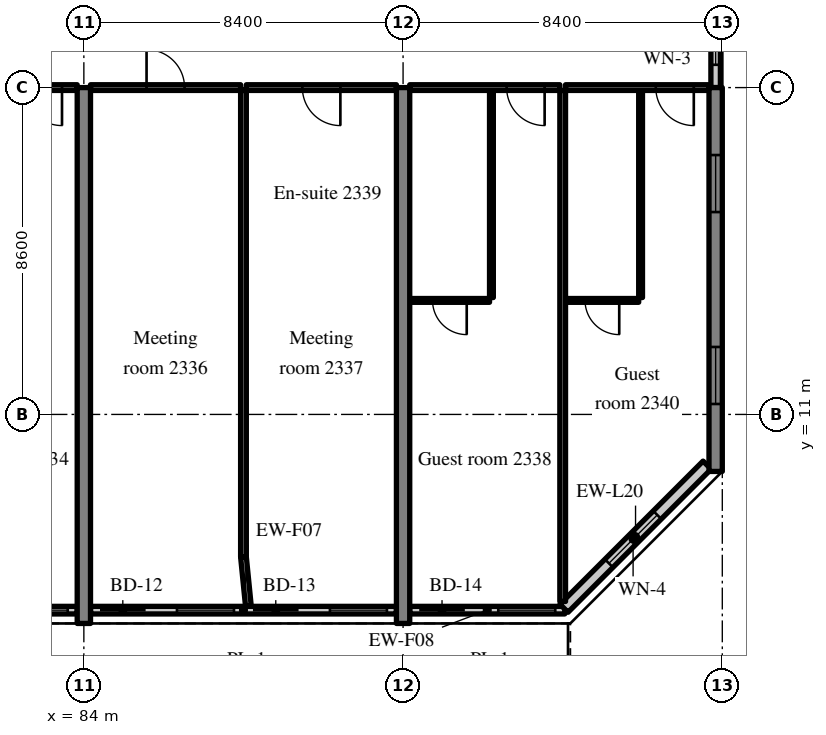
"""IFC4 building model, lengths in metres.
Left out: names, types, materials, properties, quantities, classifications, styles, units other than length and angle.
Written with IfcOpenShell. Run it as: python <this file> out.ifc"""

import sys

from ifc_helpers import new_model, si_unit, direction, frame, frame_2d, origin, place, context, subcontext, project, spatial, rectangle, extrude, source, transform, mapped, element, fill, save


model = new_model("IFC4")
c1 = context("Model", 3, precision=1e-05, world=origin(), true_north=direction((0.0, 1.0)))
c2 = subcontext(c1, "Body", "Model", "MODEL_VIEW")
j1 = project(units=[si_unit("LENGTHUNIT", "METRE"), si_unit("PLANEANGLEUNIT", "RADIAN")], contexts=[c1])
p1 = place(None, origin())
s1 = spatial("IfcSite", under=j1, at=p1, CompositionType="ELEMENT")
p2 = place(p1, origin())
s2 = spatial("IfcBuilding", under=s1, at=p2, CompositionType="ELEMENT")
p3 = place(p2, frame((0.0, 0.0, 99.0)))
s3 = spatial("IfcBuildingStorey", under=s2, at=p3, CompositionType="ELEMENT", Elevation=99.0)
m1 = source(origin(), c2, "Body", "SweptSolid", [
    extrude(rectangle(XDim=14.1, YDim=0.35, at=frame_2d((7.05, 0.0))), origin(), (0.0, 0.0, 1.0), 3.52),
])
for number, where, z_axis, x_axis in (
    (1, (84.0, 5.5, 0.0), (0.0, 0.0, 1.0), (0.0, 1.0, 0.0)),
    (2, (92.4, 5.5, 0.0), (0.0, 0.0, 1.0), (0.0, 1.0, 0.0)),
):
    element("IfcWall", number, at=place(p3, frame(where, z_axis=z_axis, x_axis=x_axis)), inside=s3, PredefinedType="SHEAR", context=c2, shape_type="MappedRepresentation", body=[
        mapped(m1, transform((0.0, 0.0, 0.0), scale=1.0)),
    ])
m2 = source(origin(), c2, "Body", "SweptSolid", [
    extrude(rectangle(XDim=10.1, YDim=0.35, at=frame_2d((5.05, 0.0))), origin(), (0.0, 0.0, 1.0), 3.52),
])
p4 = place(p3, frame((100.625, 9.5, 0.0), z_axis=(0.0, 0.0, 1.0), x_axis=(0.0, 1.0, 0.0)))
e3 = element("IfcWall", 3, at=p4, inside=s3, PredefinedType="SHEAR", context=c2, shape_type="MappedRepresentation", body=[
    mapped(m2, transform((0.0, 0.0, 0.0), scale=1.0)),
])
m3 = source(origin(), c2, "Body", "SweptSolid", [
    extrude(rectangle(XDim=1.5, YDim=1.5, at=frame_2d((0.75, 0.75))), frame((0.0, 0.185, 0.0), z_axis=(0.0, -1.0, 0.0), x_axis=(1.0, 0.0, 0.0)), (0.0, 0.0, 1.0), 0.37),
])
p5 = place(p4, frame((1.775, 0.0, 0.9)))
e4 = element("IfcOpeningElement", 4, at=p5, cuts=e3, PredefinedType="OPENING", context=c2, shape_type="MappedRepresentation", body=[
    mapped(m3, transform((0.0, 0.0, 0.0), scale=1.0)),
])
p6 = place(p4, frame((6.825, 0.0, 0.9)))
e5 = element("IfcOpeningElement", 5, at=p6, cuts=e3, PredefinedType="OPENING", context=c2, shape_type="MappedRepresentation", body=[
    mapped(m3, transform((0.0, 0.0, 0.0), scale=1.0)),
])
m4 = source(origin(), c2, "Body", "SweptSolid", [
    extrude(rectangle(XDim=8.05, YDim=0.2, at=frame_2d((4.025, 0.0))), origin(), (0.0, 0.0, 1.0), 2.82),
])
p7 = place(p3, frame((75.775, 5.85, 0.0), z_axis=(0.0, 0.0, 1.0), x_axis=(1.0, 0.0, 0.0)))
e6 = element("IfcWall", 6, at=p7, inside=s3, PredefinedType="SOLIDWALL", context=c2, shape_type="MappedRepresentation", body=[
    mapped(m4, transform((0.0, 0.0, 0.0), scale=1.0)),
])
m5 = source(origin(), c2, "Body", "SweptSolid", [
    extrude(rectangle(XDim=1.2, YDim=2.4, at=frame_2d((0.6, 1.2))), frame((0.0, 0.11, 0.0), z_axis=(0.0, -1.0, 0.0), x_axis=(1.0, 0.0, 0.0)), (0.0, 0.0, 1.0), 0.22),
])
p8 = place(p7, frame((0.25, 0.0, 0.0)))
e7 = element("IfcOpeningElement", 7, at=p8, cuts=e6, PredefinedType="OPENING", context=c2, shape_type="MappedRepresentation", body=[
    mapped(m5, transform((0.0, 0.0, 0.0), scale=1.0)),
])
m6 = source(origin(), c2, "Body", "SweptSolid", [
    extrude(rectangle(XDim=1.5, YDim=1.5, at=frame_2d((0.75, 0.75))), frame((0.0, 0.11, 0.0), z_axis=(0.0, -1.0, 0.0), x_axis=(1.0, 0.0, 0.0)), (0.0, 0.0, 1.0), 0.22),
])
p9 = place(p7, frame((2.275, 0.0, 0.9)))
e8 = element("IfcOpeningElement", 8, at=p9, cuts=e6, PredefinedType="OPENING", context=c2, shape_type="MappedRepresentation", body=[
    mapped(m6, transform((0.0, 0.0, 0.0), scale=1.0)),
])
p10 = place(p7, frame((4.275, 0.0, 0.0)))
e9 = element("IfcOpeningElement", 9, at=p10, cuts=e6, PredefinedType="OPENING", context=c2, shape_type="MappedRepresentation", body=[
    mapped(m5, transform((0.0, 0.0, 0.0), scale=1.0)),
])
p11 = place(p7, frame((6.3, 0.0, 0.9)))
e10 = element("IfcOpeningElement", 10, at=p11, cuts=e6, PredefinedType="OPENING", context=c2, shape_type="MappedRepresentation", body=[
    mapped(m6, transform((0.0, 0.0, 0.0), scale=1.0)),
])
p12 = place(p3, frame((84.175, 5.85, 0.0), z_axis=(0.0, 0.0, 1.0), x_axis=(1.0, 0.0, 0.0)))
e11 = element("IfcWall", 11, at=p12, inside=s3, PredefinedType="SOLIDWALL", context=c2, shape_type="MappedRepresentation", body=[
    mapped(m4, transform((0.0, 0.0, 0.0), scale=1.0)),
])
p13 = place(p12, frame((0.25, 0.0, 0.0)))
e12 = element("IfcOpeningElement", 12, at=p13, cuts=e11, PredefinedType="OPENING", context=c2, shape_type="MappedRepresentation", body=[
    mapped(m5, transform((0.0, 0.0, 0.0), scale=1.0)),
])
p14 = place(p12, frame((2.275, 0.0, 0.9)))
e13 = element("IfcOpeningElement", 13, at=p14, cuts=e11, PredefinedType="OPENING", context=c2, shape_type="MappedRepresentation", body=[
    mapped(m6, transform((0.0, 0.0, 0.0), scale=1.0)),
])
p15 = place(p12, frame((4.275, 0.0, 0.0)))
e14 = element("IfcOpeningElement", 14, at=p15, cuts=e11, PredefinedType="OPENING", context=c2, shape_type="MappedRepresentation", body=[
    mapped(m5, transform((0.0, 0.0, 0.0), scale=1.0)),
])
p16 = place(p12, frame((6.3, 0.0, 0.9)))
e15 = element("IfcOpeningElement", 15, at=p16, cuts=e11, PredefinedType="OPENING", context=c2, shape_type="MappedRepresentation", body=[
    mapped(m6, transform((0.0, 0.0, 0.0), scale=1.0)),
])
m7 = source(origin(), c2, "Body", "SweptSolid", [
    extrude(rectangle(XDim=4.08, YDim=0.2, at=frame_2d((2.04, 0.0))), origin(), (0.0, 0.0, 1.0), 2.82),
])
p17 = place(p3, frame((92.575, 5.85, 0.0), z_axis=(0.0, 0.0, 1.0), x_axis=(1.0, 0.0, 0.0)))
e16 = element("IfcWall", 16, at=p17, inside=s3, PredefinedType="SOLIDWALL", context=c2, shape_type="MappedRepresentation", body=[
    mapped(m7, transform((0.0, 0.0, 0.0), scale=1.0)),
])
p18 = place(p17, frame((0.25, 0.0, 0.0)))
e17 = element("IfcOpeningElement", 17, at=p18, cuts=e16, PredefinedType="OPENING", context=c2, shape_type="MappedRepresentation", body=[
    mapped(m5, transform((0.0, 0.0, 0.0), scale=1.0)),
])
p19 = place(p17, frame((2.33, 0.0, 0.9)))
e18 = element("IfcOpeningElement", 18, at=p19, cuts=e16, PredefinedType="OPENING", context=c2, shape_type="MappedRepresentation", body=[
    mapped(m6, transform((0.0, 0.0, 0.0), scale=1.0)),
])
m8 = source(origin(), c2, "Body", "SweptSolid", [
    extrude(rectangle(XDim=5.326, YDim=0.3, at=frame_2d((2.663, 0.0))), origin(), (0.0, 0.0, 1.0), 3.52),
])
p20 = place(p3, frame((96.634, 5.9, 0.0), z_axis=(0.0, 0.0, 1.0), x_axis=(0.707083859269, 0.707129702361, 0.0)))
e19 = element("IfcWall", 19, at=p20, inside=s3, PredefinedType="SOLIDWALL", context=c2, shape_type="MappedRepresentation", body=[
    mapped(m8, transform((0.0, 0.0, 0.0), scale=1.0)),
])
m9 = source(origin(), c2, "Body", "SweptSolid", [
    extrude(rectangle(XDim=1.8, YDim=1.5, at=frame_2d((0.9, 0.75))), frame((0.0, 0.16, 0.0), z_axis=(0.0, -1.0, 0.0), x_axis=(1.0, 0.0, 0.0)), (0.0, 0.0, 1.0), 0.32),
])
p21 = place(p20, frame((1.672, 0.0, 0.9)))
e20 = element("IfcOpeningElement", 20, at=p21, cuts=e19, PredefinedType="OPENING", context=c2, shape_type="MappedRepresentation", body=[
    mapped(m9, transform((0.0, 0.0, 0.0), scale=1.0)),
])
m10 = source(origin(), c2, "Body", "SweptSolid", [
    extrude(rectangle(XDim=2.4, YDim=0.25, at=frame_2d((1.2, 0.0))), origin(), (0.0, 0.0, 1.0), 2.62),
])
p22 = place(p3, frame((100.625, 19.6, 0.0), z_axis=(0.0, 0.0, 1.0), x_axis=(0.0, 1.0, 0.0)))
e21 = element("IfcWall", 21, at=p22, inside=s3, PredefinedType="SOLIDWALL", context=c2, shape_type="MappedRepresentation", body=[
    mapped(m10, transform((0.0, 0.0, 0.0), scale=1.0)),
])
m11 = source(origin(), c2, "Body", "SweptSolid", [
    extrude(rectangle(XDim=1.2, YDim=1.5, at=frame_2d((0.6, 0.75))), frame((0.0, 0.135, 0.0), z_axis=(0.0, -1.0, 0.0), x_axis=(1.0, 0.0, 0.0)), (0.0, 0.0, 1.0), 0.27),
])
p23 = place(p22, frame((0.6, 0.0, 0.9)))
e22 = element("IfcOpeningElement", 22, at=p23, cuts=e21, PredefinedType="OPENING", context=c2, shape_type="MappedRepresentation", body=[
    mapped(m11, transform((0.0, 0.0, 0.0), scale=1.0)),
])
m12 = source(origin(), c2, "Body", "SweptSolid", [
    extrude(rectangle(XDim=3.95, YDim=0.15, at=frame_2d((1.975, 0.0))), origin(), (0.0, 0.0, 1.0), 2.82),
])
p24 = place(p3, frame((79.875, 19.6, 0.0), z_axis=(0.0, 0.0, 1.0), x_axis=(1.0, 0.0, 0.0)))
e23 = element("IfcWall", 23, at=p24, inside=s3, PredefinedType="PARTITIONING", context=c2, shape_type="MappedRepresentation", body=[
    mapped(m12, transform((0.0, 0.0, 0.0), scale=1.0)),
])
m13 = source(origin(), c2, "Body", "SweptSolid", [
    extrude(rectangle(XDim=1.0, YDim=2.1, at=frame_2d((0.5, 1.05))), frame((0.0, 0.085, 0.0), z_axis=(0.0, -1.0, 0.0), x_axis=(1.0, 0.0, 0.0)), (0.0, 0.0, 1.0), 0.17),
])
p25 = place(p24, frame((2.55, 0.0, 0.0)))
e24 = element("IfcOpeningElement", 24, at=p25, cuts=e23, PredefinedType="OPENING", context=c2, shape_type="MappedRepresentation", body=[
    mapped(m13, transform((0.0, 0.0, 0.0), scale=1.0)),
])
p26 = place(p3, frame((84.175, 19.6, 0.0), z_axis=(0.0, 0.0, 1.0), x_axis=(1.0, 0.0, 0.0)))
e25 = element("IfcWall", 25, at=p26, inside=s3, PredefinedType="PARTITIONING", context=c2, shape_type="MappedRepresentation", body=[
    mapped(m12, transform((0.0, 0.0, 0.0), scale=1.0)),
])
p27 = place(p26, frame((1.475, 0.0, 0.0)))
e26 = element("IfcOpeningElement", 26, at=p27, cuts=e25, PredefinedType="OPENING", context=c2, shape_type="MappedRepresentation", body=[
    mapped(m13, transform((0.0, 0.0, 0.0), scale=1.0)),
])
m14 = source(origin(), c2, "Body", "SweptSolid", [
    extrude(rectangle(XDim=3.95, YDim=0.15, at=frame_2d((1.975, 0.0))), origin(), (0.0, 0.0, 1.0), 2.82),
])
p28 = place(p3, frame((88.275, 19.6, 0.0), z_axis=(0.0, 0.0, 1.0), x_axis=(1.0, 0.0, 0.0)))
e27 = element("IfcWall", 27, at=p28, inside=s3, PredefinedType="PARTITIONING", context=c2, shape_type="MappedRepresentation", body=[
    mapped(m14, transform((0.0, 0.0, 0.0), scale=1.0)),
])
p29 = place(p28, frame((1.475, 0.0, 0.0)))
e28 = element("IfcOpeningElement", 28, at=p29, cuts=e27, PredefinedType="OPENING", context=c2, shape_type="MappedRepresentation", body=[
    mapped(m13, transform((0.0, 0.0, 0.0), scale=1.0)),
])
m15 = source(origin(), c2, "Body", "SweptSolid", [
    extrude(rectangle(XDim=12.275, YDim=0.15, at=frame_2d((6.137, 0.0))), origin(), (0.0, 0.0, 1.0), 3.52),
])
p30 = place(p3, frame((88.2, 7.25, 0.0), z_axis=(0.0, 0.0, 1.0), x_axis=(0.0, 1.0, 0.0)))
e29 = element("IfcWall", 29, at=p30, inside=s3, PredefinedType="PARTITIONING", context=c2, shape_type="MappedRepresentation", body=[
    mapped(m15, transform((0.0, 0.0, 0.0), scale=1.0)),
])
m16 = source(origin(), c2, "Body", "SweptSolid", [
    extrude(rectangle(XDim=5.45, YDim=0.1, at=frame_2d((2.725, 0.0))), origin(), (0.0, 0.0, 1.0), 3.52),
])
p31 = place(p3, frame((94.725, 14.075, 0.0), z_axis=(0.0, 0.0, 1.0), x_axis=(0.0, 1.0, 0.0)))
e30 = element("IfcWall", 30, at=p31, inside=s3, PredefinedType="PARTITIONING", context=c2, shape_type="MappedRepresentation", body=[
    mapped(m16, transform((0.0, 0.0, 0.0), scale=1.0)),
])
m17 = source(origin(), c2, "Body", "SweptSolid", [
    extrude(rectangle(XDim=2.1, YDim=0.1, at=frame_2d((1.05, 0.0))), origin(), (0.0, 0.0, 1.0), 3.52),
])
p32 = place(p3, frame((92.575, 14.0, 0.0), z_axis=(0.0, 0.0, 1.0), x_axis=(1.0, 0.0, 0.0)))
e31 = element("IfcWall", 31, at=p32, inside=s3, PredefinedType="PARTITIONING", context=c2, shape_type="MappedRepresentation", body=[
    mapped(m17, transform((0.0, 0.0, 0.0), scale=1.0)),
])
m18 = source(origin(), c2, "Body", "SweptSolid", [
    extrude(rectangle(XDim=0.9, YDim=2.1, at=frame_2d((0.45, 1.05))), frame((0.0, 0.06, 0.0), z_axis=(0.0, -1.0, 0.0), x_axis=(1.0, 0.0, 0.0)), (0.0, 0.0, 1.0), 0.12),
])
p33 = place(p32, frame((0.6, 0.0, 0.0)))
e32 = element("IfcOpeningElement", 32, at=p33, cuts=e31, PredefinedType="OPENING", context=c2, shape_type="MappedRepresentation", body=[
    mapped(m18, transform((0.0, 0.0, 0.0), scale=1.0)),
])
p34 = place(p3, frame((92.575, 19.6, 0.0), z_axis=(0.0, 0.0, 1.0), x_axis=(1.0, 0.0, 0.0)))
e33 = element("IfcWall", 33, at=p34, inside=s3, PredefinedType="PARTITIONING", context=c2, shape_type="MappedRepresentation", body=[
    mapped(m12, transform((0.0, 0.0, 0.0), scale=1.0)),
])
p35 = place(p34, frame((2.55, 0.0, 0.0)))
e34 = element("IfcOpeningElement", 34, at=p35, cuts=e33, PredefinedType="OPENING", context=c2, shape_type="MappedRepresentation", body=[
    mapped(m13, transform((0.0, 0.0, 0.0), scale=1.0)),
])
p36 = place(p3, frame((98.65, 14.075, 0.0), z_axis=(0.0, 0.0, 1.0), x_axis=(0.0, 1.0, 0.0)))
e35 = element("IfcWall", 35, at=p36, inside=s3, PredefinedType="PARTITIONING", context=c2, shape_type="MappedRepresentation", body=[
    mapped(m16, transform((0.0, 0.0, 0.0), scale=1.0)),
])
m19 = source(origin(), c2, "Body", "SweptSolid", [
    extrude(rectangle(XDim=1.925, YDim=0.1, at=frame_2d((0.962, 0.0))), origin(), (0.0, 0.0, 1.0), 3.52),
])
p37 = place(p3, frame((96.675, 14.0, 0.0), z_axis=(0.0, 0.0, 1.0), x_axis=(1.0, 0.0, 0.0)))
e36 = element("IfcWall", 36, at=p37, inside=s3, PredefinedType="PARTITIONING", context=c2, shape_type="MappedRepresentation", body=[
    mapped(m19, transform((0.0, 0.0, 0.0), scale=1.0)),
])
p38 = place(p37, frame((0.513, 0.0, 0.0)))
e37 = element("IfcOpeningElement", 37, at=p38, cuts=e36, PredefinedType="OPENING", context=c2, shape_type="MappedRepresentation", body=[
    mapped(m18, transform((0.0, 0.0, 0.0), scale=1.0)),
])
m20 = source(origin(), c2, "Body", "SweptSolid", [
    extrude(rectangle(XDim=3.775, YDim=0.15, at=frame_2d((1.887, 0.0))), origin(), (0.0, 0.0, 1.0), 2.82),
])
p39 = place(p3, frame((96.675, 19.6, 0.0), z_axis=(0.0, 0.0, 1.0), x_axis=(1.0, 0.0, 0.0)))
e38 = element("IfcWall", 38, at=p39, inside=s3, PredefinedType="PARTITIONING", context=c2, shape_type="MappedRepresentation", body=[
    mapped(m20, transform((0.0, 0.0, 0.0), scale=1.0)),
])
p40 = place(p39, frame((2.375, 0.0, 0.0)))
e39 = element("IfcOpeningElement", 39, at=p40, cuts=e38, PredefinedType="OPENING", context=c2, shape_type="MappedRepresentation", body=[
    mapped(m13, transform((0.0, 0.0, 0.0), scale=1.0)),
])
m21 = source(origin(), c2, "Body", "SweptSolid", [
    extrude(rectangle(XDim=13.447, YDim=0.15, at=frame_2d((6.724, 0.0))), origin(), (0.0, 0.0, 1.0), 3.52),
])
p41 = place(p3, frame((96.6, 6.078, 0.0), z_axis=(0.0, 0.0, 1.0), x_axis=(0.0, 1.0, 0.0)))
e40 = element("IfcWall", 40, at=p41, inside=s3, PredefinedType="PARTITIONING", context=c2, shape_type="MappedRepresentation", body=[
    mapped(m21, transform((0.0, 0.0, 0.0), scale=1.0)),
])
m22 = source(origin(), c2, "Body", "SweptSolid", [
    extrude(rectangle(XDim=1.307, YDim=0.15, at=frame_2d((0.653, 0.0))), origin(), (0.0, 0.0, 1.0), 3.52),
])
p42 = place(p3, frame((88.33, 5.95, 0.0), z_axis=(0.0, 0.0, 1.0), x_axis=(-0.099596223396, 0.99502793543, 0.0)))
e41 = element("IfcWall", 41, at=p42, inside=s3, PredefinedType="PARTITIONING", context=c2, shape_type="MappedRepresentation", body=[
    mapped(m22, transform((0.0, 0.0, 0.0), scale=1.0)),
])
m23 = source(origin(), c2, "Body", "SweptSolid", [
    extrude(rectangle(XDim=1.5, YDim=1.5, at=frame_2d((0.75, 0.75))), frame((0.0, 0.03, 0.0), z_axis=(0.0, -1.0, 0.0), x_axis=(1.0, 0.0, 0.0)), (0.0, 0.0, 1.0), 0.06),
])
p43 = place(p11, origin())
e42 = element("IfcWindow", 42, at=p43, inside=s3, PartitioningType="SINGLE_PANEL", PredefinedType="WINDOW", context=c2, shape_type="MappedRepresentation", body=[
    mapped(m23, transform((0.0, 0.0, 0.0), scale=1.0)),
])
fill(e10, e42)
m24 = source(origin(), c2, "Body", "SweptSolid", [
    extrude(rectangle(XDim=1.2, YDim=2.4, at=frame_2d((0.6, 1.2))), frame((0.0, 0.025, 0.0), z_axis=(0.0, -1.0, 0.0), x_axis=(1.0, 0.0, 0.0)), (0.0, 0.0, 1.0), 0.05),
])
p44 = place(p13, origin())
e43 = element("IfcDoor", 43, at=p44, inside=s3, OperationType="SLIDING_TO_RIGHT", PredefinedType="DOOR", context=c2, shape_type="MappedRepresentation", body=[
    mapped(m24, transform((0.0, 0.0, 0.0), scale=1.0)),
])
fill(e12, e43)
p45 = place(p14, origin())
e44 = element("IfcWindow", 44, at=p45, inside=s3, PartitioningType="SINGLE_PANEL", PredefinedType="WINDOW", context=c2, shape_type="MappedRepresentation", body=[
    mapped(m23, transform((0.0, 0.0, 0.0), scale=1.0)),
])
fill(e13, e44)
p46 = place(p15, origin())
e45 = element("IfcDoor", 45, at=p46, inside=s3, OperationType="SLIDING_TO_LEFT", PredefinedType="DOOR", context=c2, shape_type="MappedRepresentation", body=[
    mapped(m24, transform((0.0, 0.0, 0.0), scale=1.0)),
])
fill(e14, e45)
p47 = place(p16, origin())
e46 = element("IfcWindow", 46, at=p47, inside=s3, PartitioningType="SINGLE_PANEL", PredefinedType="WINDOW", context=c2, shape_type="MappedRepresentation", body=[
    mapped(m23, transform((0.0, 0.0, 0.0), scale=1.0)),
])
fill(e15, e46)
p48 = place(p18, origin())
e47 = element("IfcDoor", 47, at=p48, inside=s3, OperationType="SLIDING_TO_RIGHT", PredefinedType="DOOR", context=c2, shape_type="MappedRepresentation", body=[
    mapped(m24, transform((0.0, 0.0, 0.0), scale=1.0)),
])
fill(e17, e47)
p49 = place(p19, origin())
e48 = element("IfcWindow", 48, at=p49, inside=s3, PartitioningType="SINGLE_PANEL", PredefinedType="WINDOW", context=c2, shape_type="MappedRepresentation", body=[
    mapped(m23, transform((0.0, 0.0, 0.0), scale=1.0)),
])
fill(e18, e48)
m25 = source(origin(), c2, "Body", "SweptSolid", [
    extrude(rectangle(XDim=1.8, YDim=1.5, at=frame_2d((0.9, 0.75))), frame((0.0, 0.03, 0.0), z_axis=(0.0, -1.0, 0.0), x_axis=(1.0, 0.0, 0.0)), (0.0, 0.0, 1.0), 0.06),
])
p50 = place(p21, origin())
e49 = element("IfcWindow", 49, at=p50, inside=s3, PartitioningType="SINGLE_PANEL", PredefinedType="WINDOW", context=c2, shape_type="MappedRepresentation", body=[
    mapped(m25, transform((0.0, 0.0, 0.0), scale=1.0)),
])
fill(e20, e49)
p51 = place(p5, origin())
e50 = element("IfcWindow", 50, at=p51, inside=s3, PartitioningType="SINGLE_PANEL", PredefinedType="WINDOW", context=c2, shape_type="MappedRepresentation", body=[
    mapped(m23, transform((0.0, 0.0, 0.0), scale=1.0)),
])
fill(e4, e50)
p52 = place(p6, origin())
e51 = element("IfcWindow", 51, at=p52, inside=s3, PartitioningType="SINGLE_PANEL", PredefinedType="WINDOW", context=c2, shape_type="MappedRepresentation", body=[
    mapped(m23, transform((0.0, 0.0, 0.0), scale=1.0)),
])
fill(e5, e51)
m26 = source(origin(), c2, "Body", "SweptSolid", [
    extrude(rectangle(XDim=1.2, YDim=1.5, at=frame_2d((0.6, 0.75))), frame((0.0, 0.03, 0.0), z_axis=(0.0, -1.0, 0.0), x_axis=(1.0, 0.0, 0.0)), (0.0, 0.0, 1.0), 0.06),
])
p53 = place(p23, origin())
e52 = element("IfcWindow", 52, at=p53, inside=s3, PartitioningType="SINGLE_PANEL", PredefinedType="WINDOW", context=c2, shape_type="MappedRepresentation", body=[
    mapped(m26, transform((0.0, 0.0, 0.0), scale=1.0)),
])
fill(e22, e52)
m27 = source(origin(), c2, "Body", "SweptSolid", [
    extrude(rectangle(XDim=1.0, YDim=2.1, at=frame_2d((0.5, 1.05))), frame((0.0, 0.025, 0.0), z_axis=(0.0, -1.0, 0.0), x_axis=(1.0, 0.0, 0.0)), (0.0, 0.0, 1.0), 0.05),
])
p54 = place(p25, origin())
e53 = element("IfcDoor", 53, at=p54, inside=s3, OperationType="SINGLE_SWING_RIGHT", PredefinedType="DOOR", context=c2, shape_type="MappedRepresentation", body=[
    mapped(m27, transform((0.0, 0.0, 0.0), scale=1.0)),
])
fill(e24, e53)
p55 = place(p27, origin())
e54 = element("IfcDoor", 54, at=p55, inside=s3, OperationType="SINGLE_SWING_LEFT", PredefinedType="DOOR", context=c2, shape_type="MappedRepresentation", body=[
    mapped(m27, transform((0.0, 0.0, 0.0), scale=1.0)),
])
fill(e26, e54)
p56 = place(p29, origin())
e55 = element("IfcDoor", 55, at=p56, inside=s3, OperationType="SINGLE_SWING_RIGHT", PredefinedType="DOOR", context=c2, shape_type="MappedRepresentation", body=[
    mapped(m27, transform((0.0, 0.0, 0.0), scale=1.0)),
])
fill(e28, e55)
m28 = source(origin(), c2, "Body", "SweptSolid", [
    extrude(rectangle(XDim=0.9, YDim=2.1, at=frame_2d((0.45, 1.05))), frame((0.0, 0.025, 0.0), z_axis=(0.0, -1.0, 0.0), x_axis=(1.0, 0.0, 0.0)), (0.0, 0.0, 1.0), 0.05),
])
p57 = place(p33, origin())
e56 = element("IfcDoor", 56, at=p57, inside=s3, OperationType="SINGLE_SWING_RIGHT", PredefinedType="DOOR", context=c2, shape_type="MappedRepresentation", body=[
    mapped(m28, transform((0.0, 0.0, 0.0), scale=1.0)),
])
fill(e32, e56)
p58 = place(p35, origin())
e57 = element("IfcDoor", 57, at=p58, inside=s3, OperationType="SINGLE_SWING_RIGHT", PredefinedType="DOOR", context=c2, shape_type="MappedRepresentation", body=[
    mapped(m27, transform((0.0, 0.0, 0.0), scale=1.0)),
])
fill(e34, e57)
p59 = place(p38, origin())
e58 = element("IfcDoor", 58, at=p59, inside=s3, OperationType="SINGLE_SWING_RIGHT", PredefinedType="DOOR", context=c2, shape_type="MappedRepresentation", body=[
    mapped(m28, transform((0.0, 0.0, 0.0), scale=1.0)),
])
fill(e37, e58)
p60 = place(p40, origin())
e59 = element("IfcDoor", 59, at=p60, inside=s3, OperationType="SINGLE_SWING_RIGHT", PredefinedType="DOOR", context=c2, shape_type="MappedRepresentation", body=[
    mapped(m27, transform((0.0, 0.0, 0.0), scale=1.0)),
])
fill(e39, e59)
save(model, sys.argv[1])
